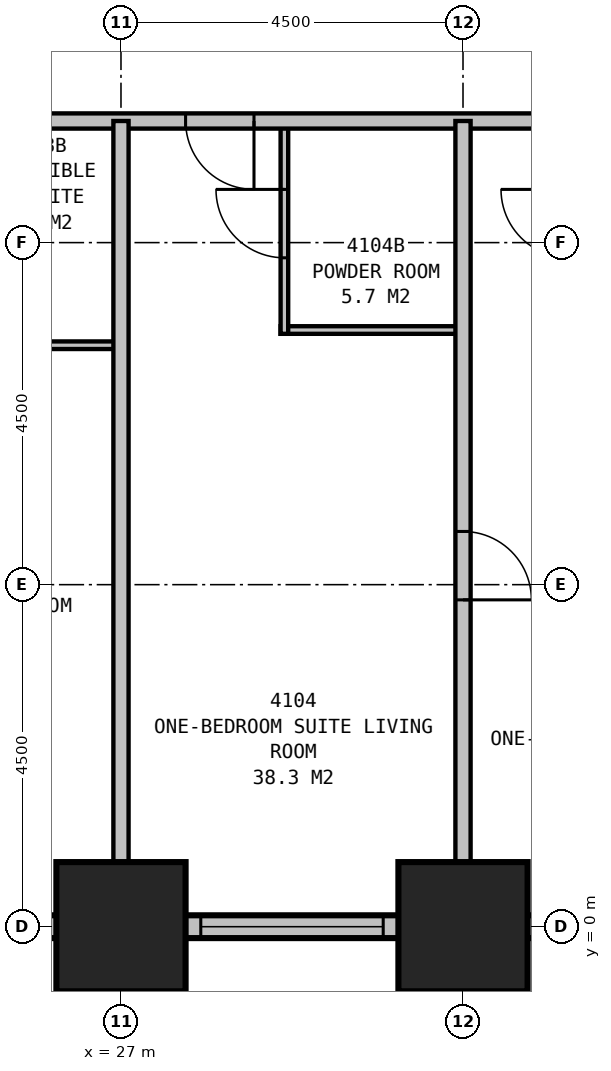
"""IFC4 building model, lengths in metres.
Left out: names, types, materials, properties, quantities, classifications, styles, units other than length and angle.
Written with IfcOpenShell. Run it as: python <this file> out.ifc"""

import sys

from ifc_helpers import new_model, si_unit, direction, frame, frame_2d, origin, origin_2d, place, context, subcontext, project, spatial, rectangle, extrude, element, fill, save


model = new_model("IFC4")
c1 = context("Model", 3, precision=1e-05, world=origin(), true_north=direction((0.0, 1.0)))
c2 = subcontext(c1, "Body", "Model", "MODEL_VIEW")
j1 = project(units=[si_unit("LENGTHUNIT", "METRE"), si_unit("PLANEANGLEUNIT", "RADIAN")], contexts=[c1])
p1 = place(None, origin())
s1 = spatial("IfcSite", under=j1, at=p1, CompositionType="ELEMENT")
p2 = place(p1, origin())
s2 = spatial("IfcBuilding", under=s1, at=p2, CompositionType="ELEMENT")
p3 = place(p2, frame((0.0, 0.0, 162.4)))
s3 = spatial("IfcBuildingStorey", under=s2, at=p3, CompositionType="ELEMENT", Elevation=162.4)
for number, where, z_axis, x_axis in (
    (1, (27.0, 0.0, 0.0), (0.0, 0.0, 1.0), (1.0, 0.0, 0.0)),
    (2, (31.5, 0.0, 0.0), (0.0, 0.0, 1.0), (1.0, 0.0, 0.0)),
):
    element("IfcColumn", number, at=place(p3, frame(where, z_axis=z_axis, x_axis=x_axis)), inside=s3, PredefinedType="COLUMN", context=c2, shape_type="SweptSolid", body=[
        extrude(rectangle(XDim=1.7, YDim=1.7, at=origin_2d()), origin(), (0.0, 0.0, 1.0), 3.5),
    ])
p4 = place(p3, frame((8.85, 0.0, 0.0), z_axis=(0.0, 0.0, 1.0), x_axis=(1.0, 0.0, 0.0)))
e3 = element("IfcWall", 3, at=p4, inside=s3, PredefinedType="STANDARD", context=c2, shape_type="SweptSolid", body=[
    extrude(rectangle(XDim=36.3, YDim=0.3, at=frame_2d((18.15, 0.0))), origin(), (0.0, 0.0, 1.0), 2.25),
])
p5 = place(p4, frame((1.65, 0.0, 0.5)))
e4 = element("IfcOpeningElement", 4, at=p5, cuts=e3, PredefinedType="OPENING", context=c2, shape_type="SweptSolid", body=[
    extrude(rectangle(XDim=1.5, YDim=1.6, at=frame_2d((0.75, 0.8))), frame((0.0, 0.16, 0.0), z_axis=(0.0, -1.0, 0.0), x_axis=(1.0, 0.0, 0.0)), (0.0, 0.0, 1.0), 0.32),
])
p6 = place(p4, frame((5.7, 0.0, 0.5)))
e5 = element("IfcOpeningElement", 5, at=p6, cuts=e3, PredefinedType="OPENING", context=c2, shape_type="SweptSolid", body=[
    extrude(rectangle(XDim=2.4, YDim=1.6, at=frame_2d((1.2, 0.8))), frame((0.0, 0.16, 0.0), z_axis=(0.0, -1.0, 0.0), x_axis=(1.0, 0.0, 0.0)), (0.0, 0.0, 1.0), 0.32),
])
p7 = place(p4, frame((10.2, 0.0, 0.5)))
e6 = element("IfcOpeningElement", 6, at=p7, cuts=e3, PredefinedType="OPENING", context=c2, shape_type="SweptSolid", body=[
    extrude(rectangle(XDim=2.4, YDim=1.6, at=frame_2d((1.2, 0.8))), frame((0.0, 0.16, 0.0), z_axis=(0.0, -1.0, 0.0), x_axis=(1.0, 0.0, 0.0)), (0.0, 0.0, 1.0), 0.32),
])
p8 = place(p4, frame((14.7, 0.0, 0.5)))
e7 = element("IfcOpeningElement", 7, at=p8, cuts=e3, PredefinedType="OPENING", context=c2, shape_type="SweptSolid", body=[
    extrude(rectangle(XDim=2.4, YDim=1.6, at=frame_2d((1.2, 0.8))), frame((0.0, 0.16, 0.0), z_axis=(0.0, -1.0, 0.0), x_axis=(1.0, 0.0, 0.0)), (0.0, 0.0, 1.0), 0.32),
])
p9 = place(p4, frame((19.2, 0.0, 0.5)))
e8 = element("IfcOpeningElement", 8, at=p9, cuts=e3, PredefinedType="OPENING", context=c2, shape_type="SweptSolid", body=[
    extrude(rectangle(XDim=2.4, YDim=1.6, at=frame_2d((1.2, 0.8))), frame((0.0, 0.16, 0.0), z_axis=(0.0, -1.0, 0.0), x_axis=(1.0, 0.0, 0.0)), (0.0, 0.0, 1.0), 0.32),
])
p10 = place(p4, frame((23.7, 0.0, 0.5)))
e9 = element("IfcOpeningElement", 9, at=p10, cuts=e3, PredefinedType="OPENING", context=c2, shape_type="SweptSolid", body=[
    extrude(rectangle(XDim=2.4, YDim=1.6, at=frame_2d((1.2, 0.8))), frame((0.0, 0.16, 0.0), z_axis=(0.0, -1.0, 0.0), x_axis=(1.0, 0.0, 0.0)), (0.0, 0.0, 1.0), 0.32),
])
p11 = place(p4, frame((28.2, 0.0, 0.5)))
e10 = element("IfcOpeningElement", 10, at=p11, cuts=e3, PredefinedType="OPENING", context=c2, shape_type="SweptSolid", body=[
    extrude(rectangle(XDim=2.4, YDim=1.6, at=frame_2d((1.2, 0.8))), frame((0.0, 0.16, 0.0), z_axis=(0.0, -1.0, 0.0), x_axis=(1.0, 0.0, 0.0)), (0.0, 0.0, 1.0), 0.32),
])
p12 = place(p4, frame((32.7, 0.0, 0.5)))
e11 = element("IfcOpeningElement", 11, at=p12, cuts=e3, PredefinedType="OPENING", context=c2, shape_type="SweptSolid", body=[
    extrude(rectangle(XDim=2.4, YDim=1.6, at=frame_2d((1.2, 0.8))), frame((0.0, 0.16, 0.0), z_axis=(0.0, -1.0, 0.0), x_axis=(1.0, 0.0, 0.0)), (0.0, 0.0, 1.0), 0.32),
])
p13 = place(p3, frame((11.2, 10.6, 0.0), z_axis=(0.0, 0.0, 1.0), x_axis=(1.0, 0.0, 0.0)))
e12 = element("IfcWall", 12, at=p13, inside=s3, PredefinedType="PARTITIONING", context=c2, shape_type="SweptSolid", body=[
    extrude(rectangle(XDim=27.1, YDim=0.2, at=frame_2d((13.55, 0.0))), origin(), (0.0, 0.0, 1.0), 3.25),
])
p14 = place(p13, frame((4.05, 0.0, 0.0), z_axis=(0.0, 0.0, 1.0), x_axis=(-1.0, 0.0, 0.0)))
e13 = element("IfcOpeningElement", 13, at=p14, cuts=e12, PredefinedType="OPENING", context=c2, shape_type="SweptSolid", body=[
    extrude(rectangle(XDim=0.9, YDim=2.1, at=frame_2d((0.45, 1.05))), frame((0.0, 0.11, 0.0), z_axis=(0.0, -1.0, 0.0), x_axis=(1.0, 0.0, 0.0)), (0.0, 0.0, 1.0), 0.22),
])
p15 = place(p13, frame((12.65, 0.0, 0.0), z_axis=(0.0, 0.0, 1.0), x_axis=(-1.0, 0.0, 0.0)))
e14 = element("IfcOpeningElement", 14, at=p15, cuts=e12, PredefinedType="OPENING", context=c2, shape_type="SweptSolid", body=[
    extrude(rectangle(XDim=1.0, YDim=2.1, at=frame_2d((0.5, 1.05))), frame((0.0, 0.11, 0.0), z_axis=(0.0, -1.0, 0.0), x_axis=(1.0, 0.0, 0.0)), (0.0, 0.0, 1.0), 0.22),
])
p16 = place(p13, frame((17.55, 0.0, 0.0), z_axis=(0.0, 0.0, 1.0), x_axis=(-1.0, 0.0, 0.0)))
e15 = element("IfcOpeningElement", 15, at=p16, cuts=e12, PredefinedType="OPENING", context=c2, shape_type="SweptSolid", body=[
    extrude(rectangle(XDim=0.9, YDim=2.1, at=frame_2d((0.45, 1.05))), frame((0.0, 0.11, 0.0), z_axis=(0.0, -1.0, 0.0), x_axis=(1.0, 0.0, 0.0)), (0.0, 0.0, 1.0), 0.22),
])
p17 = place(p13, frame((1.6, 0.0, 0.0), z_axis=(0.0, 0.0, 1.0), x_axis=(-1.0, 0.0, 0.0)))
e16 = element("IfcOpeningElement", 16, at=p17, cuts=e12, PredefinedType="OPENING", context=c2, shape_type="SweptSolid", body=[
    extrude(rectangle(XDim=0.9, YDim=2.1, at=frame_2d((0.45, 1.05))), frame((0.0, 0.11, 0.0), z_axis=(0.0, -1.0, 0.0), x_axis=(1.0, 0.0, 0.0)), (0.0, 0.0, 1.0), 0.22),
])
p18 = place(p13, frame((26.4, 0.0, 0.0), z_axis=(0.0, 0.0, 1.0), x_axis=(-1.0, 0.0, 0.0)))
e17 = element("IfcOpeningElement", 17, at=p18, cuts=e12, PredefinedType="OPENING", context=c2, shape_type="SweptSolid", body=[
    extrude(rectangle(XDim=0.9, YDim=2.1, at=frame_2d((0.45, 1.05))), frame((0.0, 0.11, 0.0), z_axis=(0.0, -1.0, 0.0), x_axis=(1.0, 0.0, 0.0)), (0.0, 0.0, 1.0), 0.22),
])
p19 = place(p3, frame((27.0, 10.6, 0.0), z_axis=(0.0, 0.0, 1.0), x_axis=(0.0, -1.0, 0.0)))
e18 = element("IfcWall", 18, at=p19, inside=s3, PredefinedType="PARTITIONING", context=c2, shape_type="SweptSolid", body=[
    extrude(rectangle(XDim=10.6, YDim=0.2, at=frame_2d((5.3, 0.0))), origin(), (0.0, 0.0, 1.0), 2.25),
])
p20 = place(p3, frame((31.5, 10.6, 0.0), z_axis=(0.0, 0.0, 1.0), x_axis=(0.0, -1.0, 0.0)))
e19 = element("IfcWall", 19, at=p20, inside=s3, PredefinedType="PARTITIONING", context=c2, shape_type="SweptSolid", body=[
    extrude(rectangle(XDim=10.6, YDim=0.2, at=frame_2d((5.3, 0.0))), origin(), (0.0, 0.0, 1.0), 2.25),
])
p21 = place(p20, frame((5.4, 0.0, 0.0)))
e20 = element("IfcOpeningElement", 20, at=p21, cuts=e19, PredefinedType="OPENING", context=c2, shape_type="SweptSolid", body=[
    extrude(rectangle(XDim=0.9, YDim=2.1, at=frame_2d((0.45, 1.05))), frame((0.0, 0.11, 0.0), z_axis=(0.0, -1.0, 0.0), x_axis=(1.0, 0.0, 0.0)), (0.0, 0.0, 1.0), 0.22),
])
p22 = place(p3, frame((24.2, 7.65, 0.0), z_axis=(0.0, 0.0, 1.0), x_axis=(1.0, 0.0, 0.0)))
e21 = element("IfcWall", 21, at=p22, inside=s3, PredefinedType="PLUMBINGWALL", context=c2, shape_type="SweptSolid", body=[
    extrude(rectangle(XDim=2.8, YDim=0.1, at=frame_2d((1.4, 0.0))), origin(), (0.0, 0.0, 1.0), 3.25),
])
p23 = place(p3, frame((29.1, 7.85, 0.0), z_axis=(0.0, 0.0, 1.0), x_axis=(1.0, 0.0, 0.0)))
e22 = element("IfcWall", 22, at=p23, inside=s3, PredefinedType="PLUMBINGWALL", context=c2, shape_type="SweptSolid", body=[
    extrude(rectangle(XDim=2.4, YDim=0.1, at=frame_2d((1.2, 0.0))), origin(), (0.0, 0.0, 1.0), 3.25),
])
p24 = place(p3, frame((29.15, 10.6, 0.0), z_axis=(0.0, 0.0, 1.0), x_axis=(0.0, -1.0, 0.0)))
e23 = element("IfcWall", 23, at=p24, inside=s3, PredefinedType="PLUMBINGWALL", context=c2, shape_type="SweptSolid", body=[
    extrude(rectangle(XDim=2.8, YDim=0.1, at=frame_2d((1.4, 0.0))), origin(), (0.0, 0.0, 1.0), 3.25),
])
p25 = place(p24, frame((1.8, 0.0, 0.0), z_axis=(0.0, 0.0, 1.0), x_axis=(-1.0, 0.0, 0.0)))
e24 = element("IfcOpeningElement", 24, at=p25, cuts=e23, PredefinedType="OPENING", context=c2, shape_type="SweptSolid", body=[
    extrude(rectangle(XDim=0.9, YDim=2.1, at=frame_2d((0.45, 1.05))), frame((0.0, 0.06, 0.0), z_axis=(0.0, -1.0, 0.0), x_axis=(1.0, 0.0, 0.0)), (0.0, 0.0, 1.0), 0.12),
])
p26 = place(p9, origin())
e25 = element("IfcWindow", 25, at=p26, inside=s3, PartitioningType="SINGLE_PANEL", PredefinedType="WINDOW", context=c2, shape_type="SweptSolid", body=[
    extrude(rectangle(XDim=2.4, YDim=1.6, at=frame_2d((1.2, 0.8))), frame((0.0, 0.03, 0.0), z_axis=(0.0, -1.0, 0.0), x_axis=(1.0, 0.0, 0.0)), (0.0, 0.0, 1.0), 0.06),
])
fill(e8, e25)
p27 = place(p16, origin())
e26 = element("IfcDoor", 26, at=p27, inside=s3, OperationType="SINGLE_SWING_LEFT", PredefinedType="DOOR", context=c2, shape_type="SweptSolid", body=[
    extrude(rectangle(XDim=0.9, YDim=2.1, at=frame_2d((0.45, 1.05))), frame((0.0, 0.025, 0.0), z_axis=(0.0, -1.0, 0.0), x_axis=(1.0, 0.0, 0.0)), (0.0, 0.0, 1.0), 0.05),
])
fill(e15, e26)
p28 = place(p21, origin())
e27 = element("IfcDoor", 27, at=p28, inside=s3, OperationType="SINGLE_SWING_RIGHT", PredefinedType="DOOR", context=c2, shape_type="SweptSolid", body=[
    extrude(rectangle(XDim=0.9, YDim=2.1, at=frame_2d((0.45, 1.05))), frame((0.0, 0.025, 0.0), z_axis=(0.0, -1.0, 0.0), x_axis=(1.0, 0.0, 0.0)), (0.0, 0.0, 1.0), 0.05),
])
fill(e20, e27)
p29 = place(p25, origin())
e28 = element("IfcDoor", 28, at=p29, inside=s3, OperationType="SINGLE_SWING_RIGHT", PredefinedType="DOOR", context=c2, shape_type="SweptSolid", body=[
    extrude(rectangle(XDim=0.9, YDim=2.1, at=frame_2d((0.45, 1.05))), frame((0.0, 0.025, 0.0), z_axis=(0.0, -1.0, 0.0), x_axis=(1.0, 0.0, 0.0)), (0.0, 0.0, 1.0), 0.05),
])
fill(e24, e28)
save(model, sys.argv[1])
